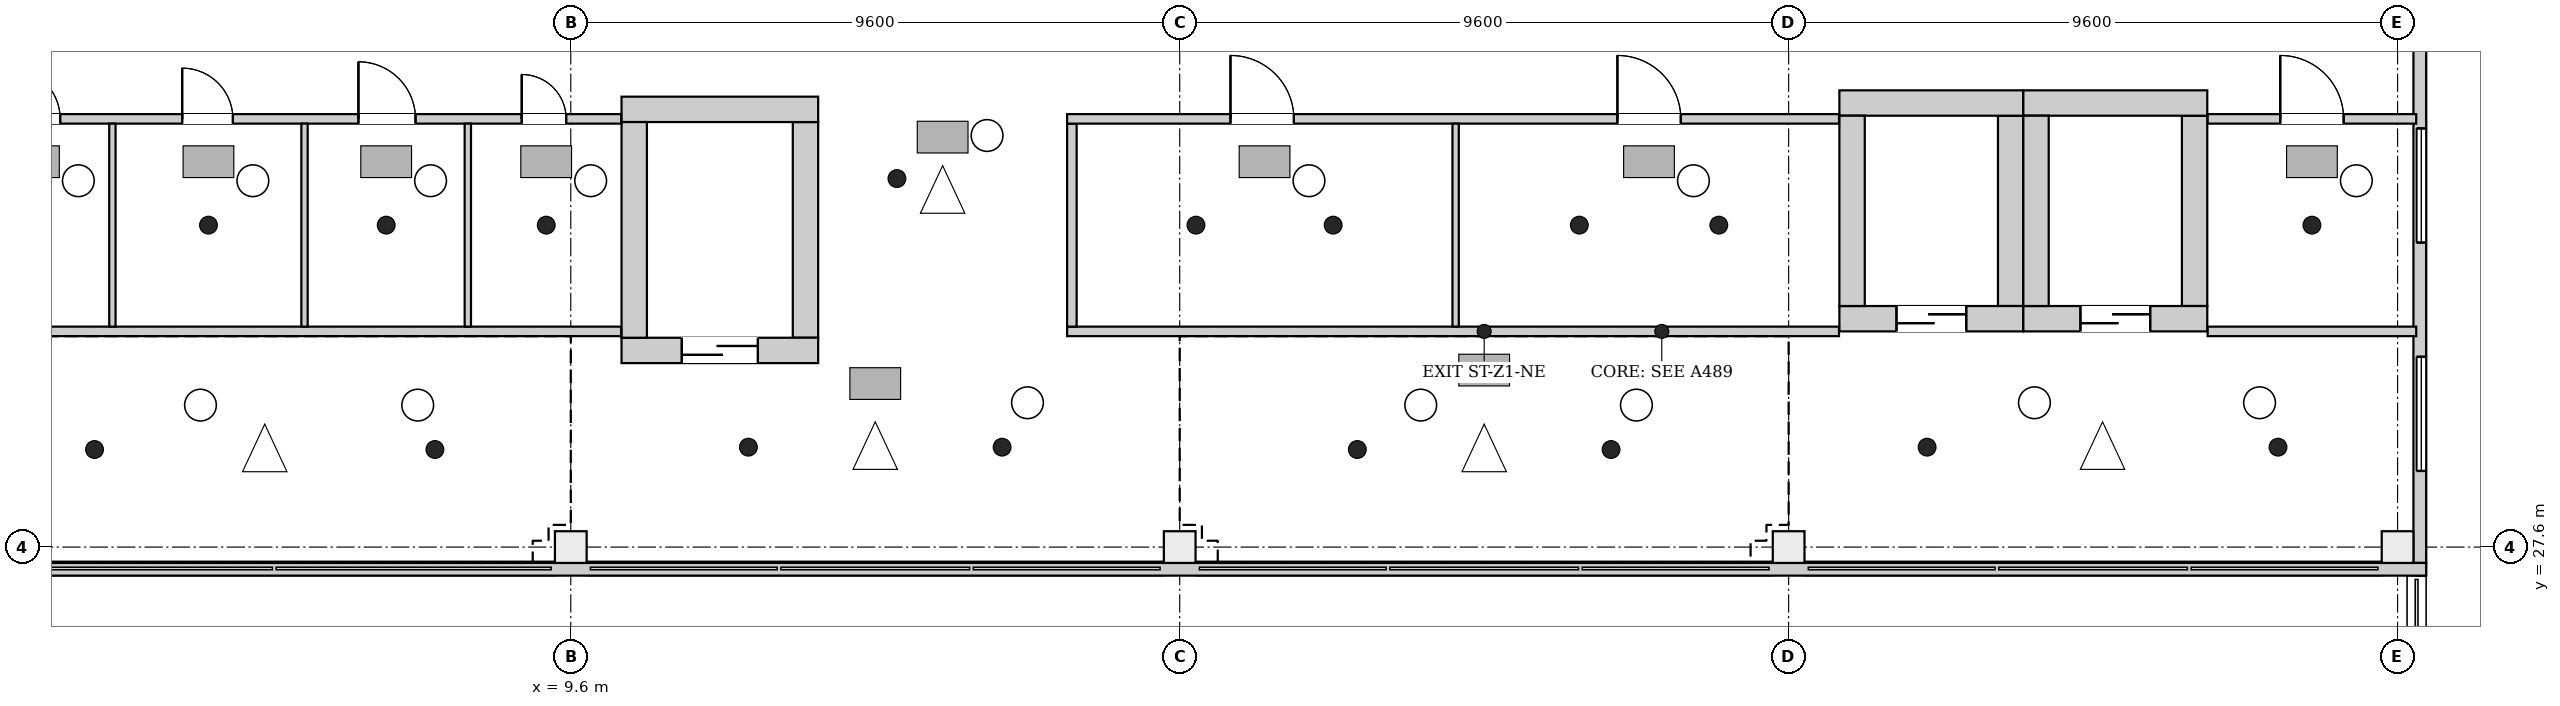
"""IFC4 building model, lengths in metres.
Left out: names, types, materials, properties, quantities, classifications, styles, units other than length and angle.
Written with IfcOpenShell. Run it as: python <this file> out.ifc"""

import sys

from ifc_helpers import new_model, si_unit, direction, frame, frame_2d, origin, origin_2d, place, context, subcontext, project, spatial, rectangle, extrude, element, fill, save


model = new_model("IFC4")
c1 = context("Model", 3, precision=1e-05, world=origin(), true_north=direction((0.0, 1.0)))
c2 = subcontext(c1, "Body", "Model", "MODEL_VIEW")
j1 = project(units=[si_unit("LENGTHUNIT", "METRE"), si_unit("PLANEANGLEUNIT", "RADIAN")], contexts=[c1])
p1 = place(None, origin())
s1 = spatial("IfcSite", under=j1, at=p1, CompositionType="ELEMENT")
p2 = place(p1, origin())
s2 = spatial("IfcBuilding", under=s1, at=p2, CompositionType="ELEMENT")
p3 = place(p2, frame((0.0, 0.0, 78.1)))
s3 = spatial("IfcBuildingStorey", under=s2, at=p3, CompositionType="ELEMENT", Elevation=78.1)
p4 = place(p3, frame((10.4, 30.7, 0.0), z_axis=(0.0, 0.0, 1.0), x_axis=(1.0, 0.0, 0.0)))
e1 = element("IfcWall", 1, at=p4, inside=s3, PredefinedType="SHEAR", context=c2, shape_type="SweptSolid", body=[
    extrude(rectangle(XDim=3.1, YDim=0.4, at=frame_2d((1.55, 0.0))), origin(), (0.0, 0.0, 1.0), 7.6),
])
p5 = place(p4, frame((0.95, 0.0, 0.0)))
e2 = element("IfcOpeningElement", 2, at=p5, cuts=e1, PredefinedType="OPENING", context=c2, shape_type="SweptSolid", body=[
    extrude(rectangle(XDim=1.2, YDim=2.1, at=frame_2d((0.6, 1.05))), frame((0.0, 0.21, 0.0), z_axis=(0.0, -1.0, 0.0), x_axis=(1.0, 0.0, 0.0)), (0.0, 0.0, 1.0), 0.42),
])
p6 = place(p3, frame((10.4, 34.5, 0.0), z_axis=(0.0, 0.0, 1.0), x_axis=(1.0, 0.0, 0.0)))
e3 = element("IfcWall", 3, at=p6, inside=s3, PredefinedType="SHEAR", context=c2, shape_type="SweptSolid", body=[
    extrude(rectangle(XDim=3.1, YDim=0.4, at=frame_2d((1.55, 0.0))), origin(), (0.0, 0.0, 1.0), 7.6),
])
for number, where, z_axis, x_axis in (
    (4, (10.6, 30.9, 0.0), (0.0, 0.0, 1.0), (0.0, 1.0, 0.0)),
    (5, (13.3, 30.9, 0.0), (0.0, 0.0, 1.0), (0.0, 1.0, 0.0)),
):
    element("IfcWall", number, at=place(p3, frame(where, z_axis=z_axis, x_axis=x_axis)), inside=s3, PredefinedType="SHEAR", context=c2, shape_type="SweptSolid", body=[
        extrude(rectangle(XDim=3.4, YDim=0.4, at=frame_2d((1.7, 0.0))), origin(), (0.0, 0.0, 1.0), 7.6),
    ])
p7 = place(p3, frame((29.6, 31.2, 0.0), z_axis=(0.0, 0.0, 1.0), x_axis=(1.0, 0.0, 0.0)))
e6 = element("IfcWall", 6, at=p7, inside=s3, PredefinedType="SHEAR", context=c2, shape_type="SweptSolid", body=[
    extrude(rectangle(XDim=2.9, YDim=0.4, at=frame_2d((1.45, 0.0))), origin(), (0.0, 0.0, 1.0), 7.6),
])
p8 = place(p7, frame((0.9, 0.0, 0.0)))
e7 = element("IfcOpeningElement", 7, at=p8, cuts=e6, PredefinedType="OPENING", context=c2, shape_type="SweptSolid", body=[
    extrude(rectangle(XDim=1.1, YDim=2.1, at=frame_2d((0.55, 1.05))), frame((0.0, 0.21, 0.0), z_axis=(0.0, -1.0, 0.0), x_axis=(1.0, 0.0, 0.0)), (0.0, 0.0, 1.0), 0.42),
])
p9 = place(p3, frame((29.6, 34.6, 0.0), z_axis=(0.0, 0.0, 1.0), x_axis=(1.0, 0.0, 0.0)))
e8 = element("IfcWall", 8, at=p9, inside=s3, PredefinedType="SHEAR", context=c2, shape_type="SweptSolid", body=[
    extrude(rectangle(XDim=2.9, YDim=0.4, at=frame_2d((1.45, 0.0))), origin(), (0.0, 0.0, 1.0), 7.6),
])
for number, where, z_axis, x_axis in (
    (9, (29.8, 31.4, 0.0), (0.0, 0.0, 1.0), (0.0, 1.0, 0.0)),
    (10, (32.3, 31.4, 0.0), (0.0, 0.0, 1.0), (0.0, 1.0, 0.0)),
):
    element("IfcWall", number, at=place(p3, frame(where, z_axis=z_axis, x_axis=x_axis)), inside=s3, PredefinedType="SHEAR", context=c2, shape_type="SweptSolid", body=[
        extrude(rectangle(XDim=3.0, YDim=0.4, at=frame_2d((1.5, 0.0))), origin(), (0.0, 0.0, 1.0), 7.6),
    ])
p10 = place(p3, frame((32.5, 31.2, 0.0), z_axis=(0.0, 0.0, 1.0), x_axis=(1.0, 0.0, 0.0)))
e11 = element("IfcWall", 11, at=p10, inside=s3, PredefinedType="SHEAR", context=c2, shape_type="SweptSolid", body=[
    extrude(rectangle(XDim=2.9, YDim=0.4, at=frame_2d((1.45, 0.0))), origin(), (0.0, 0.0, 1.0), 7.6),
])
p11 = place(p10, frame((0.9, 0.0, 0.0)))
e12 = element("IfcOpeningElement", 12, at=p11, cuts=e11, PredefinedType="OPENING", context=c2, shape_type="SweptSolid", body=[
    extrude(rectangle(XDim=1.1, YDim=2.1, at=frame_2d((0.55, 1.05))), frame((0.0, 0.21, 0.0), z_axis=(0.0, -1.0, 0.0), x_axis=(1.0, 0.0, 0.0)), (0.0, 0.0, 1.0), 0.42),
])
p12 = place(p3, frame((32.5, 34.6, 0.0), z_axis=(0.0, 0.0, 1.0), x_axis=(1.0, 0.0, 0.0)))
e13 = element("IfcWall", 13, at=p12, inside=s3, PredefinedType="SHEAR", context=c2, shape_type="SweptSolid", body=[
    extrude(rectangle(XDim=2.9, YDim=0.4, at=frame_2d((1.45, 0.0))), origin(), (0.0, 0.0, 1.0), 7.6),
])
for number, where, z_axis, x_axis in (
    (14, (32.7, 31.4, 0.0), (0.0, 0.0, 1.0), (0.0, 1.0, 0.0)),
    (15, (35.2, 31.4, 0.0), (0.0, 0.0, 1.0), (0.0, 1.0, 0.0)),
):
    element("IfcWall", number, at=place(p3, frame(where, z_axis=z_axis, x_axis=x_axis)), inside=s3, PredefinedType="SHEAR", context=c2, shape_type="SweptSolid", body=[
        extrude(rectangle(XDim=3.0, YDim=0.4, at=frame_2d((1.5, 0.0))), origin(), (0.0, 0.0, 1.0), 7.6),
    ])
for number, where, z_axis, x_axis in (
    (16, (9.6, 27.6, 0.0), (0.0, 0.0, 1.0), (1.0, 0.0, 0.0)),
    (17, (19.2, 27.6, 0.0), (0.0, 0.0, 1.0), (1.0, 0.0, 0.0)),
    (18, (28.8, 27.6, 0.0), (0.0, 0.0, 1.0), (1.0, 0.0, 0.0)),
    (19, (38.4, 27.6, 0.0), (0.0, 0.0, 1.0), (1.0, 0.0, 0.0)),
):
    element("IfcColumn", number, at=place(p3, frame(where, z_axis=z_axis, x_axis=x_axis)), inside=s3, PredefinedType="COLUMN", context=c2, shape_type="SweptSolid", body=[
        extrude(rectangle(XDim=0.5, YDim=0.5, at=origin_2d()), origin(), (0.0, 0.0, 1.0), 3.9),
    ])
p13 = place(p3, frame((38.775, 27.15, 0.0), z_axis=(0.0, 0.0, 1.0), x_axis=(0.0, 1.0, 0.0)))
e20 = element("IfcWall", 20, at=p13, inside=s3, PredefinedType="ELEMENTEDWALL", context=c2, shape_type="SweptSolid", body=[
    extrude(rectangle(XDim=19.3, YDim=0.15, at=frame_2d((9.65, 0.0))), origin(), (0.0, 0.0, 1.0), 3.9),
])
p14 = place(p13, frame((1.65, 0.0, 0.9)))
e21 = element("IfcOpeningElement", 21, at=p14, cuts=e20, PredefinedType="OPENING", context=c2, shape_type="SweptSolid", body=[
    extrude(rectangle(XDim=1.8, YDim=2.6, at=frame_2d((0.9, 1.3))), frame((0.0, 0.085, 0.0), z_axis=(0.0, -1.0, 0.0), x_axis=(1.0, 0.0, 0.0)), (0.0, 0.0, 1.0), 0.17),
])
p15 = place(p13, frame((5.25, 0.0, 0.9)))
e22 = element("IfcOpeningElement", 22, at=p15, cuts=e20, PredefinedType="OPENING", context=c2, shape_type="SweptSolid", body=[
    extrude(rectangle(XDim=1.8, YDim=2.6, at=frame_2d((0.9, 1.3))), frame((0.0, 0.085, 0.0), z_axis=(0.0, -1.0, 0.0), x_axis=(1.0, 0.0, 0.0)), (0.0, 0.0, 1.0), 0.17),
])
p16 = place(p13, frame((8.85, 0.0, 0.9)))
e23 = element("IfcOpeningElement", 23, at=p16, cuts=e20, PredefinedType="OPENING", context=c2, shape_type="SweptSolid", body=[
    extrude(rectangle(XDim=1.8, YDim=2.6, at=frame_2d((0.9, 1.3))), frame((0.0, 0.085, 0.0), z_axis=(0.0, -1.0, 0.0), x_axis=(1.0, 0.0, 0.0)), (0.0, 0.0, 1.0), 0.17),
])
p17 = place(p13, frame((12.45, 0.0, 0.9)))
e24 = element("IfcOpeningElement", 24, at=p17, cuts=e20, PredefinedType="OPENING", context=c2, shape_type="SweptSolid", body=[
    extrude(rectangle(XDim=1.8, YDim=2.6, at=frame_2d((0.9, 1.3))), frame((0.0, 0.085, 0.0), z_axis=(0.0, -1.0, 0.0), x_axis=(1.0, 0.0, 0.0)), (0.0, 0.0, 1.0), 0.17),
])
p18 = place(p13, frame((16.05, 0.0, 0.9)))
e25 = element("IfcOpeningElement", 25, at=p18, cuts=e20, PredefinedType="OPENING", context=c2, shape_type="SweptSolid", body=[
    extrude(rectangle(XDim=1.8, YDim=2.6, at=frame_2d((0.9, 1.3))), frame((0.0, 0.085, 0.0), z_axis=(0.0, -1.0, 0.0), x_axis=(1.0, 0.0, 0.0)), (0.0, 0.0, 1.0), 0.17),
])
p19 = place(p3, frame((-0.199, 27.25, 4.2), z_axis=(0.0, 0.0, 1.0), x_axis=(1.0, 0.0, 0.0)))
e26 = element("IfcWall", 26, at=p19, inside=s3, PredefinedType="PARAPET", context=c2, shape_type="SweptSolid", body=[
    extrude(rectangle(XDim=39.05, YDim=0.2, at=frame_2d((19.525, 0.0))), origin(), (0.0, 0.0, 1.0), 1.1),
])
p20 = place(p3, frame((38.75, 27.35, 4.2), z_axis=(0.0, 0.0, 1.0), x_axis=(0.0, 1.0, 0.0)))
e27 = element("IfcWall", 27, at=p20, inside=s3, PredefinedType="PARAPET", context=c2, shape_type="SweptSolid", body=[
    extrude(rectangle(XDim=18.9, YDim=0.2, at=frame_2d((9.45, 0.0))), origin(), (0.0, 0.0, 1.0), 1.1),
])
p21 = place(p3, frame((-0.044, 31.0, 0.0), z_axis=(0.0, 0.0, 1.0), x_axis=(1.0, 0.0, 0.0)))
e28 = element("IfcWall", 28, at=p21, inside=s3, PredefinedType="PARTITIONING", context=c2, shape_type="SweptSolid", body=[
    extrude(rectangle(XDim=10.438, YDim=0.15, at=frame_2d((5.219, 0.0))), origin(), (0.0, 0.0, 1.0), 3.9),
])
p22 = place(p3, frame((-0.044, 34.35, 0.0), z_axis=(0.0, 0.0, 1.0), x_axis=(1.0, 0.0, 0.0)))
e29 = element("IfcWall", 29, at=p22, inside=s3, PredefinedType="PARTITIONING", context=c2, shape_type="SweptSolid", body=[
    extrude(rectangle(XDim=10.438, YDim=0.15, at=frame_2d((5.219, 0.0))), origin(), (0.0, 0.0, 1.0), 3.9),
])
p23 = place(p22, frame((0.794, 0.0, 0.0)))
e30 = element("IfcOpeningElement", 30, at=p23, cuts=e29, PredefinedType="OPENING", context=c2, shape_type="SweptSolid", body=[
    extrude(rectangle(XDim=0.8, YDim=2.1, at=frame_2d((0.4, 1.05))), frame((0.0, 0.085, 0.0), z_axis=(0.0, -1.0, 0.0), x_axis=(1.0, 0.0, 0.0)), (0.0, 0.0, 1.0), 0.17),
])
p24 = place(p22, frame((3.517, 0.0, 0.0)))
e31 = element("IfcOpeningElement", 31, at=p24, cuts=e29, PredefinedType="OPENING", context=c2, shape_type="SweptSolid", body=[
    extrude(rectangle(XDim=0.8, YDim=2.1, at=frame_2d((0.4, 1.05))), frame((0.0, 0.085, 0.0), z_axis=(0.0, -1.0, 0.0), x_axis=(1.0, 0.0, 0.0)), (0.0, 0.0, 1.0), 0.17),
])
p25 = place(p22, frame((6.296, 0.0, 0.0)))
e32 = element("IfcOpeningElement", 32, at=p25, cuts=e29, PredefinedType="OPENING", context=c2, shape_type="SweptSolid", body=[
    extrude(rectangle(XDim=0.9, YDim=2.1, at=frame_2d((0.45, 1.05))), frame((0.0, 0.085, 0.0), z_axis=(0.0, -1.0, 0.0), x_axis=(1.0, 0.0, 0.0)), (0.0, 0.0, 1.0), 0.17),
])
p26 = place(p22, frame((8.871, 0.0, 0.0)))
e33 = element("IfcOpeningElement", 33, at=p26, cuts=e29, PredefinedType="OPENING", context=c2, shape_type="SweptSolid", body=[
    extrude(rectangle(XDim=0.7, YDim=2.1, at=frame_2d((0.35, 1.05))), frame((0.0, 0.085, 0.0), z_axis=(0.0, -1.0, 0.0), x_axis=(1.0, 0.0, 0.0)), (0.0, 0.0, 1.0), 0.17),
])
for number, where, z_axis, x_axis in (
    (34, (2.373, 31.075, 0.0), (0.0, 0.0, 1.0), (0.0, 1.0, 0.0)),
    (35, (5.402, 31.075, 0.0), (0.0, 0.0, 1.0), (0.0, 1.0, 0.0)),
    (36, (7.977, 31.075, 0.0), (0.0, 0.0, 1.0), (0.0, 1.0, 0.0)),
):
    element("IfcWall", number, at=place(p3, frame(where, z_axis=z_axis, x_axis=x_axis)), inside=s3, PredefinedType="PARTITIONING", context=c2, shape_type="SweptSolid", body=[
        extrude(rectangle(XDim=3.2, YDim=0.1, at=frame_2d((1.6, 0.0))), origin(), (0.0, 0.0, 1.0), 3.9),
    ])
p27 = place(p3, frame((17.425, 31.0, 0.0), z_axis=(0.0, 0.0, 1.0), x_axis=(1.0, 0.0, 0.0)))
e37 = element("IfcWall", 37, at=p27, inside=s3, PredefinedType="PARTITIONING", context=c2, shape_type="SweptSolid", body=[
    extrude(rectangle(XDim=12.169, YDim=0.15, at=frame_2d((6.084, 0.0))), origin(), (0.0, 0.0, 1.0), 3.9),
])
p28 = place(p3, frame((17.5, 31.075, 0.0), z_axis=(0.0, 0.0, 1.0), x_axis=(0.0, 1.0, 0.0)))
e38 = element("IfcWall", 38, at=p28, inside=s3, PredefinedType="PARTITIONING", context=c2, shape_type="SweptSolid", body=[
    extrude(rectangle(XDim=3.2, YDim=0.15, at=frame_2d((1.6, 0.0))), origin(), (0.0, 0.0, 1.0), 3.9),
])
p29 = place(p3, frame((17.425, 34.35, 0.0), z_axis=(0.0, 0.0, 1.0), x_axis=(1.0, 0.0, 0.0)))
e39 = element("IfcWall", 39, at=p29, inside=s3, PredefinedType="PARTITIONING", context=c2, shape_type="SweptSolid", body=[
    extrude(rectangle(XDim=12.169, YDim=0.15, at=frame_2d((6.084, 0.0))), origin(), (0.0, 0.0, 1.0), 3.9),
])
p30 = place(p29, frame((2.575, 0.0, 0.0)))
e40 = element("IfcOpeningElement", 40, at=p30, cuts=e39, PredefinedType="OPENING", context=c2, shape_type="SweptSolid", body=[
    extrude(rectangle(XDim=1.0, YDim=2.1, at=frame_2d((0.5, 1.05))), frame((0.0, 0.085, 0.0), z_axis=(0.0, -1.0, 0.0), x_axis=(1.0, 0.0, 0.0)), (0.0, 0.0, 1.0), 0.17),
])
p31 = place(p29, frame((8.675, 0.0, 0.0)))
e41 = element("IfcOpeningElement", 41, at=p31, cuts=e39, PredefinedType="OPENING", context=c2, shape_type="SweptSolid", body=[
    extrude(rectangle(XDim=1.0, YDim=2.1, at=frame_2d((0.5, 1.05))), frame((0.0, 0.085, 0.0), z_axis=(0.0, -1.0, 0.0), x_axis=(1.0, 0.0, 0.0)), (0.0, 0.0, 1.0), 0.17),
])
p32 = place(p3, frame((23.55, 31.075, 0.0), z_axis=(0.0, 0.0, 1.0), x_axis=(0.0, 1.0, 0.0)))
e42 = element("IfcWall", 42, at=p32, inside=s3, PredefinedType="PARTITIONING", context=c2, shape_type="SweptSolid", body=[
    extrude(rectangle(XDim=3.2, YDim=0.1, at=frame_2d((1.6, 0.0))), origin(), (0.0, 0.0, 1.0), 3.9),
])
p33 = place(p3, frame((35.406, 31.0, 0.0), z_axis=(0.0, 0.0, 1.0), x_axis=(1.0, 0.0, 0.0)))
e43 = element("IfcWall", 43, at=p33, inside=s3, PredefinedType="PARTITIONING", context=c2, shape_type="SweptSolid", body=[
    extrude(rectangle(XDim=3.288, YDim=0.15, at=frame_2d((1.644, 0.0))), origin(), (0.0, 0.0, 1.0), 3.9),
])
p34 = place(p3, frame((35.406, 34.35, 0.0), z_axis=(0.0, 0.0, 1.0), x_axis=(1.0, 0.0, 0.0)))
e44 = element("IfcWall", 44, at=p34, inside=s3, PredefinedType="PARTITIONING", context=c2, shape_type="SweptSolid", body=[
    extrude(rectangle(XDim=3.288, YDim=0.15, at=frame_2d((1.644, 0.0))), origin(), (0.0, 0.0, 1.0), 3.9),
])
p35 = place(p34, frame((1.144, 0.0, 0.0)))
e45 = element("IfcOpeningElement", 45, at=p35, cuts=e44, PredefinedType="OPENING", context=c2, shape_type="SweptSolid", body=[
    extrude(rectangle(XDim=1.0, YDim=2.1, at=frame_2d((0.5, 1.05))), frame((0.0, 0.085, 0.0), z_axis=(0.0, -1.0, 0.0), x_axis=(1.0, 0.0, 0.0)), (0.0, 0.0, 1.0), 0.17),
])
p36 = place(p14, origin())
e46 = element("IfcWindow", 46, at=p36, inside=s3, PartitioningType="SINGLE_PANEL", PredefinedType="WINDOW", context=c2, shape_type="SweptSolid", body=[
    extrude(rectangle(XDim=1.8, YDim=2.6, at=frame_2d((0.9, 1.3))), frame((0.0, 0.03, 0.0), z_axis=(0.0, -1.0, 0.0), x_axis=(1.0, 0.0, 0.0)), (0.0, 0.0, 1.0), 0.06),
])
fill(e21, e46)
p37 = place(p15, origin())
e47 = element("IfcWindow", 47, at=p37, inside=s3, PartitioningType="SINGLE_PANEL", PredefinedType="WINDOW", context=c2, shape_type="SweptSolid", body=[
    extrude(rectangle(XDim=1.8, YDim=2.6, at=frame_2d((0.9, 1.3))), frame((0.0, 0.03, 0.0), z_axis=(0.0, -1.0, 0.0), x_axis=(1.0, 0.0, 0.0)), (0.0, 0.0, 1.0), 0.06),
])
fill(e22, e47)
p38 = place(p2, frame((0.0, 0.0, 82.3)))
p39 = place(p38, frame((0.0, 0.0, -0.3)))
p40 = place(p39, frame((2.1, 29.95, 0.0)))
p41 = place(p40, frame((0.0, 0.0, 0.25)))
e48 = element("IfcWindow", 48, at=p41, inside=s3, PartitioningType="SINGLE_PANEL", PredefinedType="SKYLIGHT", context=c2, shape_type="SweptSolid", body=[
    extrude(rectangle(XDim=1.8, YDim=3.0, at=origin_2d()), origin(), (0.0, 0.0, 1.0), 0.05),
])
p42 = place(p39, frame((7.6, 29.95, 0.0)))
p43 = place(p42, frame((0.0, 0.0, 0.25)))
e49 = element("IfcWindow", 49, at=p43, inside=s3, PartitioningType="SINGLE_PANEL", PredefinedType="SKYLIGHT", context=c2, shape_type="SweptSolid", body=[
    extrude(rectangle(XDim=1.8, YDim=3.0, at=origin_2d()), origin(), (0.0, 0.0, 1.0), 0.05),
])
p44 = place(p39, frame((16.1, 29.95, 0.0)))
p45 = place(p44, frame((0.0, 0.0, 0.25)))
e50 = element("IfcWindow", 50, at=p45, inside=s3, PartitioningType="SINGLE_PANEL", PredefinedType="SKYLIGHT", context=c2, shape_type="SweptSolid", body=[
    extrude(rectangle(XDim=1.8, YDim=3.0, at=origin_2d()), origin(), (0.0, 0.0, 1.0), 0.05),
])
p46 = place(p39, frame((4.3, 29.65, 0.0)))
p47 = place(p46, frame((0.0, 0.0, 0.25)))
e51 = element("IfcDoor", 51, at=p47, inside=s3, OperationType="SWING_FIXED_LEFT", PredefinedType="TRAPDOOR", context=c2, shape_type="SweptSolid", body=[
    extrude(rectangle(XDim=1.0, YDim=1.0, at=origin_2d()), origin(), (0.0, 0.0, 1.0), 0.05),
])
p48 = place(p5, origin())
e52 = element("IfcDoor", 52, at=p48, inside=s3, OperationType="DOUBLE_DOOR_SLIDING", PredefinedType="DOOR", context=c2, shape_type="SweptSolid", body=[
    extrude(rectangle(XDim=1.2, YDim=2.1, at=frame_2d((0.6, 1.05))), frame((0.0, 0.025, 0.0), z_axis=(0.0, -1.0, 0.0), x_axis=(1.0, 0.0, 0.0)), (0.0, 0.0, 1.0), 0.05),
])
fill(e2, e52)
p49 = place(p8, origin())
e53 = element("IfcDoor", 53, at=p49, inside=s3, OperationType="DOUBLE_DOOR_SLIDING", PredefinedType="DOOR", context=c2, shape_type="SweptSolid", body=[
    extrude(rectangle(XDim=1.1, YDim=2.1, at=frame_2d((0.55, 1.05))), frame((0.0, 0.025, 0.0), z_axis=(0.0, -1.0, 0.0), x_axis=(1.0, 0.0, 0.0)), (0.0, 0.0, 1.0), 0.05),
])
fill(e7, e53)
p50 = place(p11, origin())
e54 = element("IfcDoor", 54, at=p50, inside=s3, OperationType="DOUBLE_DOOR_SLIDING", PredefinedType="DOOR", context=c2, shape_type="SweptSolid", body=[
    extrude(rectangle(XDim=1.1, YDim=2.1, at=frame_2d((0.55, 1.05))), frame((0.0, 0.025, 0.0), z_axis=(0.0, -1.0, 0.0), x_axis=(1.0, 0.0, 0.0)), (0.0, 0.0, 1.0), 0.05),
])
fill(e12, e54)
p51 = place(p23, origin())
e55 = element("IfcDoor", 55, at=p51, inside=s3, OperationType="SINGLE_SWING_RIGHT", PredefinedType="DOOR", context=c2, shape_type="SweptSolid", body=[
    extrude(rectangle(XDim=0.8, YDim=2.1, at=frame_2d((0.4, 1.05))), frame((0.0, 0.025, 0.0), z_axis=(0.0, -1.0, 0.0), x_axis=(1.0, 0.0, 0.0)), (0.0, 0.0, 1.0), 0.05),
])
fill(e30, e55)
p52 = place(p24, origin())
e56 = element("IfcDoor", 56, at=p52, inside=s3, OperationType="SINGLE_SWING_LEFT", PredefinedType="DOOR", context=c2, shape_type="SweptSolid", body=[
    extrude(rectangle(XDim=0.8, YDim=2.1, at=frame_2d((0.4, 1.05))), frame((0.0, 0.025, 0.0), z_axis=(0.0, -1.0, 0.0), x_axis=(1.0, 0.0, 0.0)), (0.0, 0.0, 1.0), 0.05),
])
fill(e31, e56)
p53 = place(p25, origin())
e57 = element("IfcDoor", 57, at=p53, inside=s3, OperationType="SINGLE_SWING_RIGHT", PredefinedType="DOOR", context=c2, shape_type="SweptSolid", body=[
    extrude(rectangle(XDim=0.9, YDim=2.1, at=frame_2d((0.45, 1.05))), frame((0.0, 0.025, 0.0), z_axis=(0.0, -1.0, 0.0), x_axis=(1.0, 0.0, 0.0)), (0.0, 0.0, 1.0), 0.05),
])
fill(e32, e57)
p54 = place(p26, origin())
e58 = element("IfcDoor", 58, at=p54, inside=s3, OperationType="SINGLE_SWING_LEFT", PredefinedType="DOOR", context=c2, shape_type="SweptSolid", body=[
    extrude(rectangle(XDim=0.7, YDim=2.1, at=frame_2d((0.35, 1.05))), frame((0.0, 0.025, 0.0), z_axis=(0.0, -1.0, 0.0), x_axis=(1.0, 0.0, 0.0)), (0.0, 0.0, 1.0), 0.05),
])
fill(e33, e58)
p55 = place(p30, origin())
e59 = element("IfcDoor", 59, at=p55, inside=s3, OperationType="SINGLE_SWING_LEFT", PredefinedType="DOOR", context=c2, shape_type="SweptSolid", body=[
    extrude(rectangle(XDim=1.0, YDim=2.1, at=frame_2d((0.5, 1.05))), frame((0.0, 0.025, 0.0), z_axis=(0.0, -1.0, 0.0), x_axis=(1.0, 0.0, 0.0)), (0.0, 0.0, 1.0), 0.05),
])
fill(e40, e59)
p56 = place(p31, origin())
e60 = element("IfcDoor", 60, at=p56, inside=s3, OperationType="SINGLE_SWING_LEFT", PredefinedType="DOOR", context=c2, shape_type="SweptSolid", body=[
    extrude(rectangle(XDim=1.0, YDim=2.1, at=frame_2d((0.5, 1.05))), frame((0.0, 0.025, 0.0), z_axis=(0.0, -1.0, 0.0), x_axis=(1.0, 0.0, 0.0)), (0.0, 0.0, 1.0), 0.05),
])
fill(e41, e60)
p57 = place(p35, origin())
e61 = element("IfcDoor", 61, at=p57, inside=s3, OperationType="SINGLE_SWING_LEFT", PredefinedType="DOOR", context=c2, shape_type="SweptSolid", body=[
    extrude(rectangle(XDim=1.0, YDim=2.1, at=frame_2d((0.5, 1.05))), frame((0.0, 0.025, 0.0), z_axis=(0.0, -1.0, 0.0), x_axis=(1.0, 0.0, 0.0)), (0.0, 0.0, 1.0), 0.05),
])
fill(e45, e61)
save(model, sys.argv[1])
